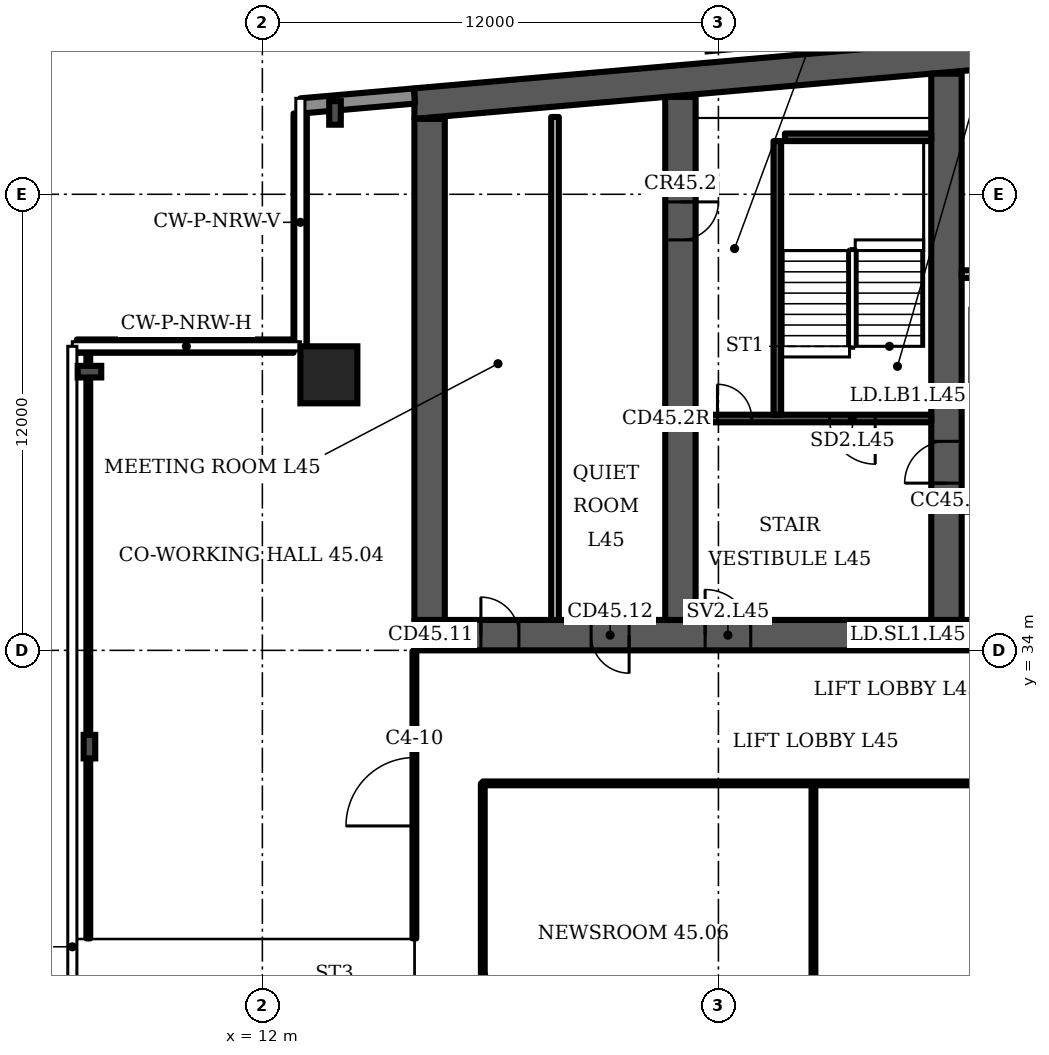
"""IFC4 building model, lengths in metres.
Left out: names, types, materials, properties, quantities, classifications, styles, units other than length and angle.
Written with IfcOpenShell. Run it as: python <this file> out.ifc"""

import sys

from ifc_helpers import new_model, si_unit, direction, frame, frame_2d, origin, origin_2d, place, context, subcontext, project, spatial, polyline, rectangle, i_section, outline, extrude, element, fill, save


model = new_model("IFC4")
c1 = context("Model", 3, precision=1e-05, world=origin(), true_north=direction((0.0, 1.0)))
c2 = subcontext(c1, "Body", "Model", "MODEL_VIEW")
j1 = project(units=[si_unit("LENGTHUNIT", "METRE"), si_unit("PLANEANGLEUNIT", "RADIAN")], contexts=[c1])
p1 = place(None, origin())
s1 = spatial("IfcSite", under=j1, at=p1, CompositionType="ELEMENT")
p2 = place(p1, origin())
s2 = spatial("IfcBuilding", under=s1, at=p2, CompositionType="ELEMENT")
p3 = place(p2, frame((0.0, 0.0, 184.3)))
s3 = spatial("IfcBuildingStorey", under=s2, at=p3, CompositionType="ELEMENT", Elevation=184.3)
p4 = place(p3, frame((0.0, 0.0, -0.0)))
e1 = element("IfcWall", 1, at=p4, inside=s3, PredefinedType="SHEAR", context=c2, shape_type="SweptSolid", body=[
    extrude(outline(polyline([(16.0, 47.984), (37.0, 49.822), (58.0, 47.984), (58.0, 48.787), (37.0, 50.625), (16.0, 48.787), (16.0, 47.984)])), origin(), (0.0, 0.0, 1.0), 3.6),
])
p5 = place(p3, frame((16.0, 34.4, 0.0), z_axis=(0.0, 0.0, 1.0), x_axis=(1.0, 0.0, 0.0)))
e2 = element("IfcWall", 2, at=p5, inside=s3, PredefinedType="SHEAR", context=c2, shape_type="SweptSolid", body=[
    extrude(rectangle(XDim=42.0, YDim=0.8, at=frame_2d((21.0, 0.0))), origin(), (0.0, 0.0, 1.0), 3.6),
])
p6 = place(p5, frame((1.75, 0.0, 0.0)))
e3 = element("IfcOpeningElement", 3, at=p6, cuts=e2, PredefinedType="OPENING", context=c2, shape_type="SweptSolid", body=[
    extrude(rectangle(XDim=1.0, YDim=2.1, at=frame_2d((0.5, 1.05))), frame((0.0, 0.41, 0.0), z_axis=(0.0, -1.0, 0.0), x_axis=(1.0, 0.0, 0.0)), (0.0, 0.0, 1.0), 0.82),
])
p7 = place(p5, frame((4.65, 0.0, 0.0)))
e4 = element("IfcOpeningElement", 4, at=p7, cuts=e2, PredefinedType="OPENING", context=c2, shape_type="SweptSolid", body=[
    extrude(rectangle(XDim=1.0, YDim=2.1, at=frame_2d((0.5, 1.05))), frame((0.0, 0.41, 0.0), z_axis=(0.0, -1.0, 0.0), x_axis=(1.0, 0.0, 0.0)), (0.0, 0.0, 1.0), 0.82),
])
p8 = place(p5, frame((7.65, 0.0, 0.0)))
e5 = element("IfcOpeningElement", 5, at=p8, cuts=e2, PredefinedType="OPENING", context=c2, shape_type="SweptSolid", body=[
    extrude(rectangle(XDim=1.2, YDim=2.1, at=frame_2d((0.6, 1.05))), frame((0.0, 0.41, 0.0), z_axis=(0.0, -1.0, 0.0), x_axis=(1.0, 0.0, 0.0)), (0.0, 0.0, 1.0), 0.82),
])
p9 = place(p5, frame((14.767, 0.0, 0.0)))
e6 = element("IfcOpeningElement", 6, at=p9, cuts=e2, PredefinedType="OPENING", context=c2, shape_type="SweptSolid", body=[
    extrude(rectangle(XDim=1.1, YDim=2.1, at=frame_2d((0.55, 1.05))), frame((0.0, 0.41, 0.0), z_axis=(0.0, -1.0, 0.0), x_axis=(1.0, 0.0, 0.0)), (0.0, 0.0, 1.0), 0.82),
])
p10 = place(p5, frame((19.133, 0.0, 0.0)))
e7 = element("IfcOpeningElement", 7, at=p10, cuts=e2, PredefinedType="OPENING", context=c2, shape_type="SweptSolid", body=[
    extrude(rectangle(XDim=1.1, YDim=2.1, at=frame_2d((0.55, 1.05))), frame((0.0, 0.41, 0.0), z_axis=(0.0, -1.0, 0.0), x_axis=(1.0, 0.0, 0.0)), (0.0, 0.0, 1.0), 0.82),
])
p11 = place(p5, frame((16.8, 0.0, 0.0)))
e8 = element("IfcOpeningElement", 8, at=p11, cuts=e2, PredefinedType="OPENING", context=c2, shape_type="SweptSolid", body=[
    extrude(rectangle(XDim=1.4, YDim=2.1, at=frame_2d((0.7, 1.05))), frame((0.0, 0.41, 0.0), z_axis=(0.0, -1.0, 0.0), x_axis=(1.0, 0.0, 0.0)), (0.0, 0.0, 1.0), 0.82),
])
p12 = place(p5, frame((21.767, 0.0, 0.0)))
e9 = element("IfcOpeningElement", 9, at=p12, cuts=e2, PredefinedType="OPENING", context=c2, shape_type="SweptSolid", body=[
    extrude(rectangle(XDim=1.1, YDim=2.1, at=frame_2d((0.55, 1.05))), frame((0.0, 0.41, 0.0), z_axis=(0.0, -1.0, 0.0), x_axis=(1.0, 0.0, 0.0)), (0.0, 0.0, 1.0), 0.82),
])
p13 = place(p5, frame((23.95, 0.0, 0.0)))
e10 = element("IfcOpeningElement", 10, at=p13, cuts=e2, PredefinedType="OPENING", context=c2, shape_type="SweptSolid", body=[
    extrude(rectangle(XDim=1.1, YDim=2.1, at=frame_2d((0.55, 1.05))), frame((0.0, 0.41, 0.0), z_axis=(0.0, -1.0, 0.0), x_axis=(1.0, 0.0, 0.0)), (0.0, 0.0, 1.0), 0.82),
])
p14 = place(p5, frame((26.133, 0.0, 0.0)))
e11 = element("IfcOpeningElement", 11, at=p14, cuts=e2, PredefinedType="OPENING", context=c2, shape_type="SweptSolid", body=[
    extrude(rectangle(XDim=1.1, YDim=2.1, at=frame_2d((0.55, 1.05))), frame((0.0, 0.41, 0.0), z_axis=(0.0, -1.0, 0.0), x_axis=(1.0, 0.0, 0.0)), (0.0, 0.0, 1.0), 0.82),
])
p15 = place(p5, frame((33.15, 0.0, 0.0)))
e12 = element("IfcOpeningElement", 12, at=p15, cuts=e2, PredefinedType="OPENING", context=c2, shape_type="SweptSolid", body=[
    extrude(rectangle(XDim=1.2, YDim=2.1, at=frame_2d((0.6, 1.05))), frame((0.0, 0.41, 0.0), z_axis=(0.0, -1.0, 0.0), x_axis=(1.0, 0.0, 0.0)), (0.0, 0.0, 1.0), 0.82),
])
p16 = place(p5, frame((35.817, 0.0, 0.0)))
e13 = element("IfcOpeningElement", 13, at=p16, cuts=e2, PredefinedType="OPENING", context=c2, shape_type="SweptSolid", body=[
    extrude(rectangle(XDim=1.0, YDim=2.1, at=frame_2d((0.5, 1.05))), frame((0.0, 0.41, 0.0), z_axis=(0.0, -1.0, 0.0), x_axis=(1.0, 0.0, 0.0)), (0.0, 0.0, 1.0), 0.82),
])
p17 = place(p5, frame((39.95, 0.0, 0.0)))
e14 = element("IfcOpeningElement", 14, at=p17, cuts=e2, PredefinedType="OPENING", context=c2, shape_type="SweptSolid", body=[
    extrude(rectangle(XDim=1.0, YDim=2.1, at=frame_2d((0.5, 1.05))), frame((0.0, 0.41, 0.0), z_axis=(0.0, -1.0, 0.0), x_axis=(1.0, 0.0, 0.0)), (0.0, 0.0, 1.0), 0.82),
])
p18 = place(p5, frame((37.767, 0.0, 0.0)))
e15 = element("IfcOpeningElement", 15, at=p18, cuts=e2, PredefinedType="OPENING", context=c2, shape_type="SweptSolid", body=[
    extrude(rectangle(XDim=1.4, YDim=2.1, at=frame_2d((0.7, 1.05))), frame((0.0, 0.41, 0.0), z_axis=(0.0, -1.0, 0.0), x_axis=(1.0, 0.0, 0.0)), (0.0, 0.0, 1.0), 0.82),
])
p19 = place(p3, frame((16.4, 34.8, 0.0), z_axis=(0.0, 0.0, 1.0), x_axis=(0.0, 1.0, 0.0)))
e16 = element("IfcWall", 16, at=p19, inside=s3, PredefinedType="SHEAR", context=c2, shape_type="SweptSolid", body=[
    extrude(rectangle(XDim=13.184, YDim=0.8, at=frame_2d((6.592, 0.0))), origin(), (0.0, 0.0, 1.0), 3.6),
])
p20 = place(p3, frame((23.0, 34.8, 0.0), z_axis=(0.0, 0.0, 1.0), x_axis=(0.0, 1.0, 0.0)))
e17 = element("IfcWall", 17, at=p20, inside=s3, PredefinedType="SHEAR", context=c2, shape_type="SweptSolid", body=[
    extrude(rectangle(XDim=13.762, YDim=0.8, at=frame_2d((6.881, 0.0))), origin(), (0.0, 0.0, 1.0), 3.6),
])
p21 = place(p20, frame((10.0, 0.0, 0.0)))
e18 = element("IfcOpeningElement", 18, at=p21, cuts=e17, PredefinedType="OPENING", context=c2, shape_type="SweptSolid", body=[
    extrude(rectangle(XDim=1.0, YDim=2.1, at=frame_2d((0.5, 1.05))), frame((0.0, 0.41, 0.0), z_axis=(0.0, -1.0, 0.0), x_axis=(1.0, 0.0, 0.0)), (0.0, 0.0, 1.0), 0.82),
])
p22 = place(p3, frame((30.0, 34.8, 0.0), z_axis=(0.0, 0.0, 1.0), x_axis=(0.0, 1.0, 0.0)))
e19 = element("IfcWall", 19, at=p22, inside=s3, PredefinedType="SHEAR", context=c2, shape_type="SweptSolid", body=[
    extrude(rectangle(XDim=14.374, YDim=0.8, at=frame_2d((7.187, 0.0))), origin(), (0.0, 0.0, 1.0), 3.6),
])
p23 = place(p22, frame((3.6, 0.0, 0.0)))
e20 = element("IfcOpeningElement", 20, at=p23, cuts=e19, PredefinedType="OPENING", context=c2, shape_type="SweptSolid", body=[
    extrude(rectangle(XDim=1.1, YDim=2.1, at=frame_2d((0.55, 1.05))), frame((0.0, 0.41, 0.0), z_axis=(0.0, -1.0, 0.0), x_axis=(1.0, 0.0, 0.0)), (0.0, 0.0, 1.0), 0.82),
])
p24 = place(p3, frame((13.75, 41.25, 0.0), z_axis=(0.0, 0.0, 1.0), x_axis=(1.0, 0.0, 0.0)))
e21 = element("IfcColumn", 21, at=p24, inside=s3, PredefinedType="COLUMN", context=c2, shape_type="SweptSolid", body=[
    extrude(rectangle(XDim=1.5, YDim=1.5, at=origin_2d()), origin(), (0.0, 0.0, 1.0), 3.6),
])
for number, where, z_axis, x_axis in (
    (22, (13.911, 48.141, 0.0), (0.0, 0.0, 1.0), (-1.0, 0.0, 0.0)),
    (23, (7.45, 41.333, 0.0), (0.0, 0.0, 1.0), (0.0, 1.0, 0.0)),
    (24, (7.45, 31.467, 0.0), (0.0, 0.0, 1.0), (-1.0, 0.0, 0.0)),
):
    element("IfcColumn", number, at=place(p3, frame(where, z_axis=z_axis, x_axis=x_axis)), inside=s3, PredefinedType="COLUMN", context=c2, shape_type="SweptSolid", body=[
        extrude(i_section(OverallWidth=0.305, OverallDepth=0.62, WebThickness=0.021, FlangeThickness=0.04, FilletRadius=0.027, at=origin_2d()), origin(), (0.0, 0.0, 1.0), 3.6),
    ])
p25 = place(p3, frame((16.0, 48.587, 0.0), z_axis=(0.0, 0.0, 1.0), x_axis=(-0.996194, -0.087168, 0.0)))
e25 = element("IfcWall", 25, at=p25, inside=s3, PredefinedType="SOLIDWALL", context=c2, shape_type="SweptSolid", body=[
    extrude(rectangle(XDim=2.994, YDim=0.4, at=frame_2d((1.497, 0.0))), origin(), (0.0, 0.0, 1.0), 3.2),
])
p26 = place(p3, frame((12.995, 48.126, 0.0), z_axis=(0.0, 0.0, 1.0), x_axis=(0.0, -1.0, 0.0)))
e26 = element("IfcWall", 26, at=p26, inside=s3, PredefinedType="SOLIDWALL", context=c2, shape_type="SweptSolid", body=[
    extrude(rectangle(XDim=6.126, YDim=0.35, at=frame_2d((3.063, 0.0))), origin(), (0.0, 0.0, 1.0), 1.0),
])
p27 = place(p3, frame((12.82, 42.005, 0.0), z_axis=(0.0, 0.0, 1.0), x_axis=(-1.0, 0.0, 0.0)))
e27 = element("IfcWall", 27, at=p27, inside=s3, PredefinedType="SOLIDWALL", context=c2, shape_type="SweptSolid", body=[
    extrude(rectangle(XDim=5.7, YDim=0.35, at=frame_2d((2.85, 0.0))), origin(), (0.0, 0.0, 1.0), 1.0),
])
p28 = place(p3, frame((19.7, 34.8, 0.0), z_axis=(0.0, 0.0, 1.0), x_axis=(0.0, 1.0, 0.0)))
e28 = element("IfcWall", 28, at=p28, inside=s3, PredefinedType="PARTITIONING", context=c2, shape_type="SweptSolid", body=[
    extrude(rectangle(XDim=13.234, YDim=0.2, at=frame_2d((6.617, 0.0))), origin(), (0.0, 0.0, 1.0), 3.2),
])
p29 = place(p3, frame((23.4, 40.1, 0.0), z_axis=(0.0, 0.0, 1.0), x_axis=(1.0, 0.0, 0.0)))
e29 = element("IfcWall", 29, at=p29, inside=s3, PredefinedType="SHEAR", context=c2, shape_type="SweptSolid", body=[
    extrude(rectangle(XDim=6.2, YDim=0.2, at=frame_2d((3.1, 0.0))), origin(), (0.0, 0.0, 1.0), 3.2),
])
p30 = place(p29, frame((3.525, 0.0, 0.0)))
e30 = element("IfcOpeningElement", 30, at=p30, cuts=e29, PredefinedType="OPENING", context=c2, shape_type="SweptSolid", body=[
    extrude(rectangle(XDim=1.2, YDim=2.1, at=frame_2d((0.6, 1.05))), frame((0.0, 0.11, 0.0), z_axis=(0.0, -1.0, 0.0), x_axis=(1.0, 0.0, 0.0)), (0.0, 0.0, 1.0), 0.22),
])
p31 = place(p29, frame((0.575, 0.0, 0.0)))
e31 = element("IfcOpeningElement", 31, at=p31, cuts=e29, PredefinedType="OPENING", context=c2, shape_type="SweptSolid", body=[
    extrude(rectangle(XDim=0.9, YDim=2.1, at=frame_2d((0.45, 1.05))), frame((0.0, 0.11, 0.0), z_axis=(0.0, -1.0, 0.0), x_axis=(1.0, 0.0, 0.0)), (0.0, 0.0, 1.0), 0.22),
])
p32 = place(p3, frame((25.55, 40.2, 0.0), z_axis=(0.0, 0.0, 1.0), x_axis=(0.0, 1.0, 0.0)))
e32 = element("IfcWall", 32, at=p32, inside=s3, PredefinedType="SHEAR", context=c2, shape_type="SweptSolid", body=[
    extrude(rectangle(XDim=7.2, YDim=0.2, at=frame_2d((3.6, 0.0))), origin(), (0.0, 0.0, 1.0), 3.2),
])
p33 = place(p3, frame((25.75, 47.5, 0.0), z_axis=(0.0, 0.0, 1.0), x_axis=(1.0, 0.0, 0.0)))
e33 = element("IfcWall", 33, at=p33, inside=s3, PredefinedType="SHEAR", context=c2, shape_type="SweptSolid", body=[
    extrude(rectangle(XDim=3.85, YDim=0.2, at=frame_2d((1.925, 0.0))), origin(), (0.0, 0.0, 1.0), 3.2),
])
p34 = place(p3, frame((30.4, 40.7, 0.0), z_axis=(0.0, 0.0, 1.0), x_axis=(1.0, 0.0, 0.0)))
e34 = element("IfcWall", 34, at=p34, inside=s3, PredefinedType="PARTITIONING", context=c2, shape_type="SweptSolid", body=[
    extrude(rectangle(XDim=6.2, YDim=0.2, at=frame_2d((3.1, 0.0))), origin(), (0.0, 0.0, 1.0), 3.2),
])
p35 = place(p34, frame((0.367, 0.0, 0.0)))
e35 = element("IfcOpeningElement", 35, at=p35, cuts=e34, PredefinedType="OPENING", context=c2, shape_type="SweptSolid", body=[
    extrude(rectangle(XDim=1.1, YDim=2.1, at=frame_2d((0.55, 1.05))), frame((0.0, 0.11, 0.0), z_axis=(0.0, -1.0, 0.0), x_axis=(1.0, 0.0, 0.0)), (0.0, 0.0, 1.0), 0.22),
])
p36 = place(p34, frame((2.55, 0.0, 0.0)))
e36 = element("IfcOpeningElement", 36, at=p36, cuts=e34, PredefinedType="OPENING", context=c2, shape_type="SweptSolid", body=[
    extrude(rectangle(XDim=1.1, YDim=2.1, at=frame_2d((0.55, 1.05))), frame((0.0, 0.11, 0.0), z_axis=(0.0, -1.0, 0.0), x_axis=(1.0, 0.0, 0.0)), (0.0, 0.0, 1.0), 0.22),
])
p37 = place(p34, frame((4.733, 0.0, 0.0)))
e37 = element("IfcOpeningElement", 37, at=p37, cuts=e34, PredefinedType="OPENING", context=c2, shape_type="SweptSolid", body=[
    extrude(rectangle(XDim=1.1, YDim=2.1, at=frame_2d((0.55, 1.05))), frame((0.0, 0.11, 0.0), z_axis=(0.0, -1.0, 0.0), x_axis=(1.0, 0.0, 0.0)), (0.0, 0.0, 1.0), 0.22),
])
p38 = place(p3, frame((0.0, 0.0, -0.0)))
e38 = element("IfcWall", 38, at=p38, inside=s3, PredefinedType="PARTITIONING", context=c2, shape_type="SweptSolid", body=[
    extrude(outline(polyline([(32.233, 37.65), (30.4, 37.65), (30.4, 37.85), (32.233, 37.85), (32.433, 37.85), (32.433, 34.8), (32.233, 34.8), (32.233, 37.65)])), origin(), (0.0, 0.0, 1.0), 3.2),
])
p39 = place(p3, frame((0.0, 0.0, -0.0)))
e39 = element("IfcWall", 39, at=p39, inside=s3, PredefinedType="PARTITIONING", context=c2, shape_type="SweptSolid", body=[
    extrude(outline(polyline([(32.433, 40.8), (32.233, 40.8), (32.233, 43.8), (30.4, 43.8), (30.4, 44.0), (36.6, 44.0), (36.6, 43.8), (34.767, 43.8), (34.767, 40.8), (34.567, 40.8), (34.567, 43.8), (32.433, 43.8), (32.433, 40.8)])), origin(), (0.0, 0.0, 1.0), 3.2),
])
p40 = place(p3, frame((7.42, 26.42, 0.0), z_axis=(0.0, 0.0, 1.0), x_axis=(0.0, 1.0, 0.0)))
e40 = element("IfcWall", 40, at=p40, inside=s3, PredefinedType="PARTITIONING", context=c2, shape_type="SweptSolid", body=[
    extrude(rectangle(XDim=15.56, YDim=0.1, at=frame_2d((7.78, 0.0))), origin(), (0.0, 0.0, 1.0), 2.58),
])
p41 = place(p3, frame((16.0, 26.42, 0.0), z_axis=(0.0, 0.0, 1.0), x_axis=(0.0, 1.0, 0.0)))
e41 = element("IfcWall", 41, at=p41, inside=s3, PredefinedType="PARTITIONING", context=c2, shape_type="SweptSolid", body=[
    extrude(rectangle(XDim=7.56, YDim=0.1, at=frame_2d((3.78, 0.0))), origin(), (0.0, 0.0, 1.0), 3.2),
])
p42 = place(p41, frame((2.96, 0.0, 0.0)))
e42 = element("IfcOpeningElement", 42, at=p42, cuts=e41, PredefinedType="OPENING", context=c2, shape_type="SweptSolid", body=[
    extrude(rectangle(XDim=1.8, YDim=2.1, at=frame_2d((0.9, 1.05))), frame((0.0, 0.06, 0.0), z_axis=(0.0, -1.0, 0.0), x_axis=(1.0, 0.0, 0.0)), (0.0, 0.0, 1.0), 0.12),
])
p43 = place(p3, frame((17.8, 25.485, 0.0), z_axis=(0.0, 0.0, 1.0), x_axis=(0.0, 1.0, 0.0)))
e43 = element("IfcWall", 43, at=p43, inside=s3, PredefinedType="PARTITIONING", context=c2, shape_type="SweptSolid", body=[
    extrude(rectangle(XDim=5.015, YDim=0.1, at=frame_2d((2.507, 0.0))), origin(), (0.0, 0.0, 1.0), 3.2),
])
p44 = place(p3, frame((17.8, 30.5, 0.0), z_axis=(0.0, 0.0, 1.0), x_axis=(1.0, 0.0, 0.0)))
e44 = element("IfcWall", 44, at=p44, inside=s3, PredefinedType="PARTITIONING", context=c2, shape_type="SweptSolid", body=[
    extrude(rectangle(XDim=19.05, YDim=0.1, at=frame_2d((9.525, 0.0))), origin(), (0.0, 0.0, 1.0), 3.2),
])
p45 = place(p3, frame((18.055, 24.66, 0.0), z_axis=(0.0, 0.0, 1.0), x_axis=(-0.295119, 0.955462, 0.0)))
e45 = element("IfcWall", 45, at=p45, inside=s3, PredefinedType="PARTITIONING", context=c2, shape_type="SweptSolid", body=[
    extrude(rectangle(XDim=0.864, YDim=0.1, at=frame_2d((0.432, 0.0))), origin(), (0.0, 0.0, 1.0), 3.2),
])
p46 = place(p3, frame((26.5, 13.535, 0.0), z_axis=(0.0, 0.0, 1.0), x_axis=(0.0, 1.0, 0.0)))
e46 = element("IfcWall", 46, at=p46, inside=s3, PredefinedType="PARTITIONING", context=c2, shape_type="SweptSolid", body=[
    extrude(rectangle(XDim=16.965, YDim=0.1, at=frame_2d((8.482, 0.0))), origin(), (0.0, 0.0, 1.0), 3.2),
])
p47 = place(p6, origin())
e47 = element("IfcDoor", 47, at=p47, inside=s3, OperationType="SINGLE_SWING_LEFT", PredefinedType="DOOR", context=c2, shape_type="SweptSolid", body=[
    extrude(rectangle(XDim=1.0, YDim=2.1, at=frame_2d((0.5, 1.05))), frame((0.0, 0.4, 0.0), z_axis=(0.0, -1.0, 0.0), x_axis=(1.0, 0.0, 0.0)), (0.0, 0.0, 1.0), 0.8),
])
fill(e3, e47)
p48 = place(p7, origin())
e48 = element("IfcDoor", 48, at=p48, inside=s3, OperationType="SINGLE_SWING_RIGHT", PredefinedType="DOOR", context=c2, shape_type="SweptSolid", body=[
    extrude(rectangle(XDim=1.0, YDim=2.1, at=frame_2d((0.5, 1.05))), frame((0.0, 0.4, 0.0), z_axis=(0.0, -1.0, 0.0), x_axis=(1.0, 0.0, 0.0)), (0.0, 0.0, 1.0), 0.8),
])
fill(e4, e48)
p49 = place(p30, origin())
e49 = element("IfcDoor", 49, at=p49, inside=s3, OperationType="SINGLE_SWING_RIGHT", PredefinedType="DOOR", context=c2, shape_type="SweptSolid", body=[
    extrude(rectangle(XDim=1.2, YDim=2.1, at=frame_2d((0.6, 1.05))), frame((0.0, 0.025, 0.0), z_axis=(0.0, -1.0, 0.0), x_axis=(1.0, 0.0, 0.0)), (0.0, 0.0, 1.0), 0.05),
])
fill(e30, e49)
p50 = place(p31, origin())
e50 = element("IfcDoor", 50, at=p50, inside=s3, OperationType="SINGLE_SWING_LEFT", PredefinedType="DOOR", context=c2, shape_type="SweptSolid", body=[
    extrude(rectangle(XDim=0.9, YDim=2.1, at=frame_2d((0.45, 1.05))), frame((0.0, 0.025, 0.0), z_axis=(0.0, -1.0, 0.0), x_axis=(1.0, 0.0, 0.0)), (0.0, 0.0, 1.0), 0.05),
])
fill(e31, e50)
p51 = place(p8, origin())
e51 = element("IfcDoor", 51, at=p51, inside=s3, OperationType="SINGLE_SWING_LEFT", PredefinedType="DOOR", context=c2, shape_type="SweptSolid", body=[
    extrude(rectangle(XDim=1.2, YDim=2.1, at=frame_2d((0.6, 1.05))), frame((0.0, 0.025, 0.0), z_axis=(0.0, -1.0, 0.0), x_axis=(1.0, 0.0, 0.0)), (0.0, 0.0, 1.0), 0.05),
])
fill(e5, e51)
p52 = place(p21, origin())
e52 = element("IfcDoor", 52, at=p52, inside=s3, OperationType="SINGLE_SWING_RIGHT", PredefinedType="DOOR", context=c2, shape_type="SweptSolid", body=[
    extrude(rectangle(XDim=1.0, YDim=2.1, at=frame_2d((0.5, 1.05))), frame((0.0, 0.4, 0.0), z_axis=(0.0, -1.0, 0.0), x_axis=(1.0, 0.0, 0.0)), (0.0, 0.0, 1.0), 0.8),
])
fill(e18, e52)
p53 = place(p23, origin())
e53 = element("IfcDoor", 53, at=p53, inside=s3, OperationType="SINGLE_SWING_LEFT", PredefinedType="DOOR", context=c2, shape_type="SweptSolid", body=[
    extrude(rectangle(XDim=1.1, YDim=2.1, at=frame_2d((0.55, 1.05))), frame((0.0, 0.025, 0.0), z_axis=(0.0, -1.0, 0.0), x_axis=(1.0, 0.0, 0.0)), (0.0, 0.0, 1.0), 0.05),
])
fill(e20, e53)
p54 = place(p42, origin())
e54 = element("IfcDoor", 54, at=p54, inside=s3, OperationType="DOUBLE_DOOR_SINGLE_SWING", PredefinedType="DOOR", context=c2, shape_type="SweptSolid", body=[
    extrude(rectangle(XDim=1.8, YDim=2.1, at=frame_2d((0.9, 1.05))), frame((0.0, 0.025, 0.0), z_axis=(0.0, -1.0, 0.0), x_axis=(1.0, 0.0, 0.0)), (0.0, 0.0, 1.0), 0.05),
])
fill(e42, e54)
save(model, sys.argv[1])
